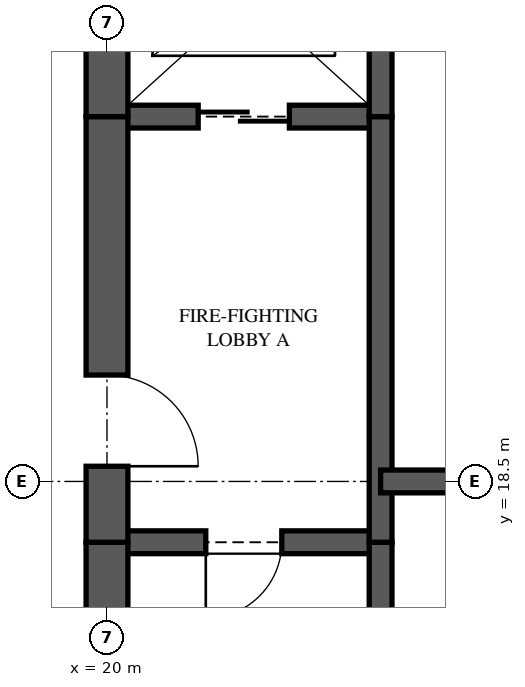
"""IFC4 building model, lengths in metres.
Left out: names, types, materials, properties, quantities, classifications, styles, units other than length and angle.
Written with IfcOpenShell. Run it as: python <this file> out.ifc"""

import sys

from ifc_helpers import new_model, si_unit, direction, frame, frame_2d, origin, place, context, subcontext, project, spatial, rectangle, extrude, element, fill, save


model = new_model("IFC4")
c1 = context("Model", 3, precision=1e-05, world=origin(), true_north=direction((0.0, 1.0)))
c2 = subcontext(c1, "Body", "Model", "MODEL_VIEW")
j1 = project(units=[si_unit("LENGTHUNIT", "METRE"), si_unit("PLANEANGLEUNIT", "RADIAN")], contexts=[c1])
p1 = place(None, origin())
s1 = spatial("IfcSite", under=j1, at=p1, CompositionType="ELEMENT")
p2 = place(p1, origin())
s2 = spatial("IfcBuilding", under=s1, at=p2, CompositionType="ELEMENT")
p3 = place(p2, frame((0.0, 0.0, 256.45)))
s3 = spatial("IfcBuildingStorey", under=s2, at=p3, CompositionType="ELEMENT", Elevation=256.45)
p4 = place(p3, frame((20.0, 26.325, 0.0), z_axis=(0.0, 0.0, 1.0), x_axis=(0.0, -1.0, 0.0)))
e1 = element("IfcWall", 1, at=p4, inside=s3, PredefinedType="SHEAR", context=c2, shape_type="SweptSolid", body=[
    extrude(rectangle(XDim=3.025, YDim=0.55, at=frame_2d((1.512, 0.0))), origin(), (0.0, 0.0, 1.0), 3.5),
])
p5 = place(p3, frame((20.0, 23.3, 0.0), z_axis=(0.0, 0.0, 1.0), x_axis=(0.0, -1.0, 0.0)))
e2 = element("IfcWall", 2, at=p5, inside=s3, PredefinedType="SHEAR", context=c2, shape_type="SweptSolid", body=[
    extrude(rectangle(XDim=5.6, YDim=0.55, at=frame_2d((2.8, 0.0))), origin(), (0.0, 0.0, 1.0), 3.5),
])
p6 = place(p5, frame((3.4, 0.0, 0.0)))
e3 = element("IfcOpeningElement", 3, at=p6, cuts=e2, PredefinedType="OPENING", context=c2, shape_type="SweptSolid", body=[
    extrude(rectangle(XDim=1.2, YDim=2.2, at=frame_2d((0.6, 1.1))), frame((0.0, 0.285, 0.0), z_axis=(0.0, -1.0, 0.0), x_axis=(1.0, 0.0, 0.0)), (0.0, 0.0, 1.0), 0.57),
])
p7 = place(p3, frame((20.0, 17.7, 0.0), z_axis=(0.0, 0.0, 1.0), x_axis=(0.0, -1.0, 0.0)))
e4 = element("IfcWall", 4, at=p7, inside=s3, PredefinedType="SHEAR", context=c2, shape_type="SweptSolid", body=[
    extrude(rectangle(XDim=4.7, YDim=0.55, at=frame_2d((2.35, 0.0))), origin(), (0.0, 0.0, 1.0), 3.5),
])
p8 = place(p3, frame((23.6, 10.675, 0.0), z_axis=(0.0, 0.0, 1.0), x_axis=(0.0, 1.0, 0.0)))
e5 = element("IfcWall", 5, at=p8, inside=s3, PredefinedType="SHEAR", context=c2, shape_type="SweptSolid", body=[
    extrude(rectangle(XDim=7.025, YDim=0.3, at=frame_2d((3.512, 0.0))), origin(), (0.0, 0.0, 1.0), 3.5),
])
p9 = place(p3, frame((23.6, 17.7, 0.0), z_axis=(0.0, 0.0, 1.0), x_axis=(0.0, 1.0, 0.0)))
e6 = element("IfcWall", 6, at=p9, inside=s3, PredefinedType="SHEAR", context=c2, shape_type="SweptSolid", body=[
    extrude(rectangle(XDim=5.6, YDim=0.3, at=frame_2d((2.8, 0.0))), origin(), (0.0, 0.0, 1.0), 3.5),
])
p10 = place(p3, frame((23.6, 23.3, 0.0), z_axis=(0.0, 0.0, 1.0), x_axis=(0.0, 1.0, 0.0)))
e7 = element("IfcWall", 7, at=p10, inside=s3, PredefinedType="SHEAR", context=c2, shape_type="SweptSolid", body=[
    extrude(rectangle(XDim=3.025, YDim=0.3, at=frame_2d((1.512, 0.0))), origin(), (0.0, 0.0, 1.0), 3.5),
])
p11 = place(p3, frame((20.0, 17.7, 0.0), z_axis=(0.0, 0.0, 1.0), x_axis=(1.0, 0.0, 0.0)))
e8 = element("IfcWall", 8, at=p11, inside=s3, PredefinedType="SHEAR", context=c2, shape_type="SweptSolid", body=[
    extrude(rectangle(XDim=3.6, YDim=0.3, at=frame_2d((1.8, 0.0))), origin(), (0.0, 0.0, 1.0), 3.5),
])
p12 = place(p11, frame((1.3, 0.0, 0.0)))
e9 = element("IfcOpeningElement", 9, at=p12, cuts=e8, PredefinedType="OPENING", context=c2, shape_type="SweptSolid", body=[
    extrude(rectangle(XDim=1.0, YDim=2.1, at=frame_2d((0.5, 1.05))), frame((0.0, 0.16, 0.0), z_axis=(0.0, -1.0, 0.0), x_axis=(1.0, 0.0, 0.0)), (0.0, 0.0, 1.0), 0.32),
])
p13 = place(p3, frame((20.0, 23.3, 0.0), z_axis=(0.0, 0.0, 1.0), x_axis=(1.0, 0.0, 0.0)))
e10 = element("IfcWall", 10, at=p13, inside=s3, PredefinedType="SHEAR", context=c2, shape_type="SweptSolid", body=[
    extrude(rectangle(XDim=3.6, YDim=0.3, at=frame_2d((1.8, 0.0))), origin(), (0.0, 0.0, 1.0), 3.5),
])
p14 = place(p13, frame((1.2, 0.0, 0.0)))
e11 = element("IfcOpeningElement", 11, at=p14, cuts=e10, PredefinedType="OPENING", context=c2, shape_type="SweptSolid", body=[
    extrude(rectangle(XDim=1.2, YDim=2.1, at=frame_2d((0.6, 1.05))), frame((0.0, 0.16, 0.0), z_axis=(0.0, -1.0, 0.0), x_axis=(1.0, 0.0, 0.0)), (0.0, 0.0, 1.0), 0.32),
])
p15 = place(p3, frame((23.6, 18.5, 0.0), z_axis=(0.0, 0.0, 1.0), x_axis=(1.0, 0.0, 0.0)))
e12 = element("IfcWall", 12, at=p15, inside=s3, PredefinedType="SHEAR", context=c2, shape_type="SweptSolid", body=[
    extrude(rectangle(XDim=2.4, YDim=0.3, at=frame_2d((1.2, 0.0))), origin(), (0.0, 0.0, 1.0), 3.5),
])
p16 = place(p12, frame((1.0, 0.0, 0.0), z_axis=(0.0, 0.0, 1.0), x_axis=(-1.0, 0.0, 0.0)))
e13 = element("IfcDoor", 13, at=p16, inside=s3, OperationType="SINGLE_SWING_RIGHT", PredefinedType="DOOR", context=c2, shape_type="SweptSolid", body=[
    extrude(rectangle(XDim=1.0, YDim=2.1, at=frame_2d((0.5, 1.05))), frame((0.0, 0.025, 0.0), z_axis=(0.0, -1.0, 0.0), x_axis=(1.0, 0.0, 0.0)), (0.0, 0.0, 1.0), 0.05),
])
fill(e9, e13)
p17 = place(p6, origin())
e14 = element("IfcDoor", 14, at=p17, inside=s3, OperationType="SINGLE_SWING_RIGHT", PredefinedType="DOOR", context=c2, shape_type="SweptSolid", body=[
    extrude(rectangle(XDim=1.2, YDim=2.2, at=frame_2d((0.6, 1.1))), frame((0.0, 0.025, 0.0), z_axis=(0.0, -1.0, 0.0), x_axis=(1.0, 0.0, 0.0)), (0.0, 0.0, 1.0), 0.05),
])
fill(e3, e14)
p18 = place(p14, origin())
e15 = element("IfcDoor", 15, at=p18, inside=s3, OperationType="SLIDING_TO_LEFT", PredefinedType="DOOR", context=c2, shape_type="SweptSolid", body=[
    extrude(rectangle(XDim=1.2, YDim=2.1, at=frame_2d((0.6, 1.05))), frame((0.0, 0.025, 0.0), z_axis=(0.0, -1.0, 0.0), x_axis=(1.0, 0.0, 0.0)), (0.0, 0.0, 1.0), 0.05),
])
fill(e11, e15)
save(model, sys.argv[1])
